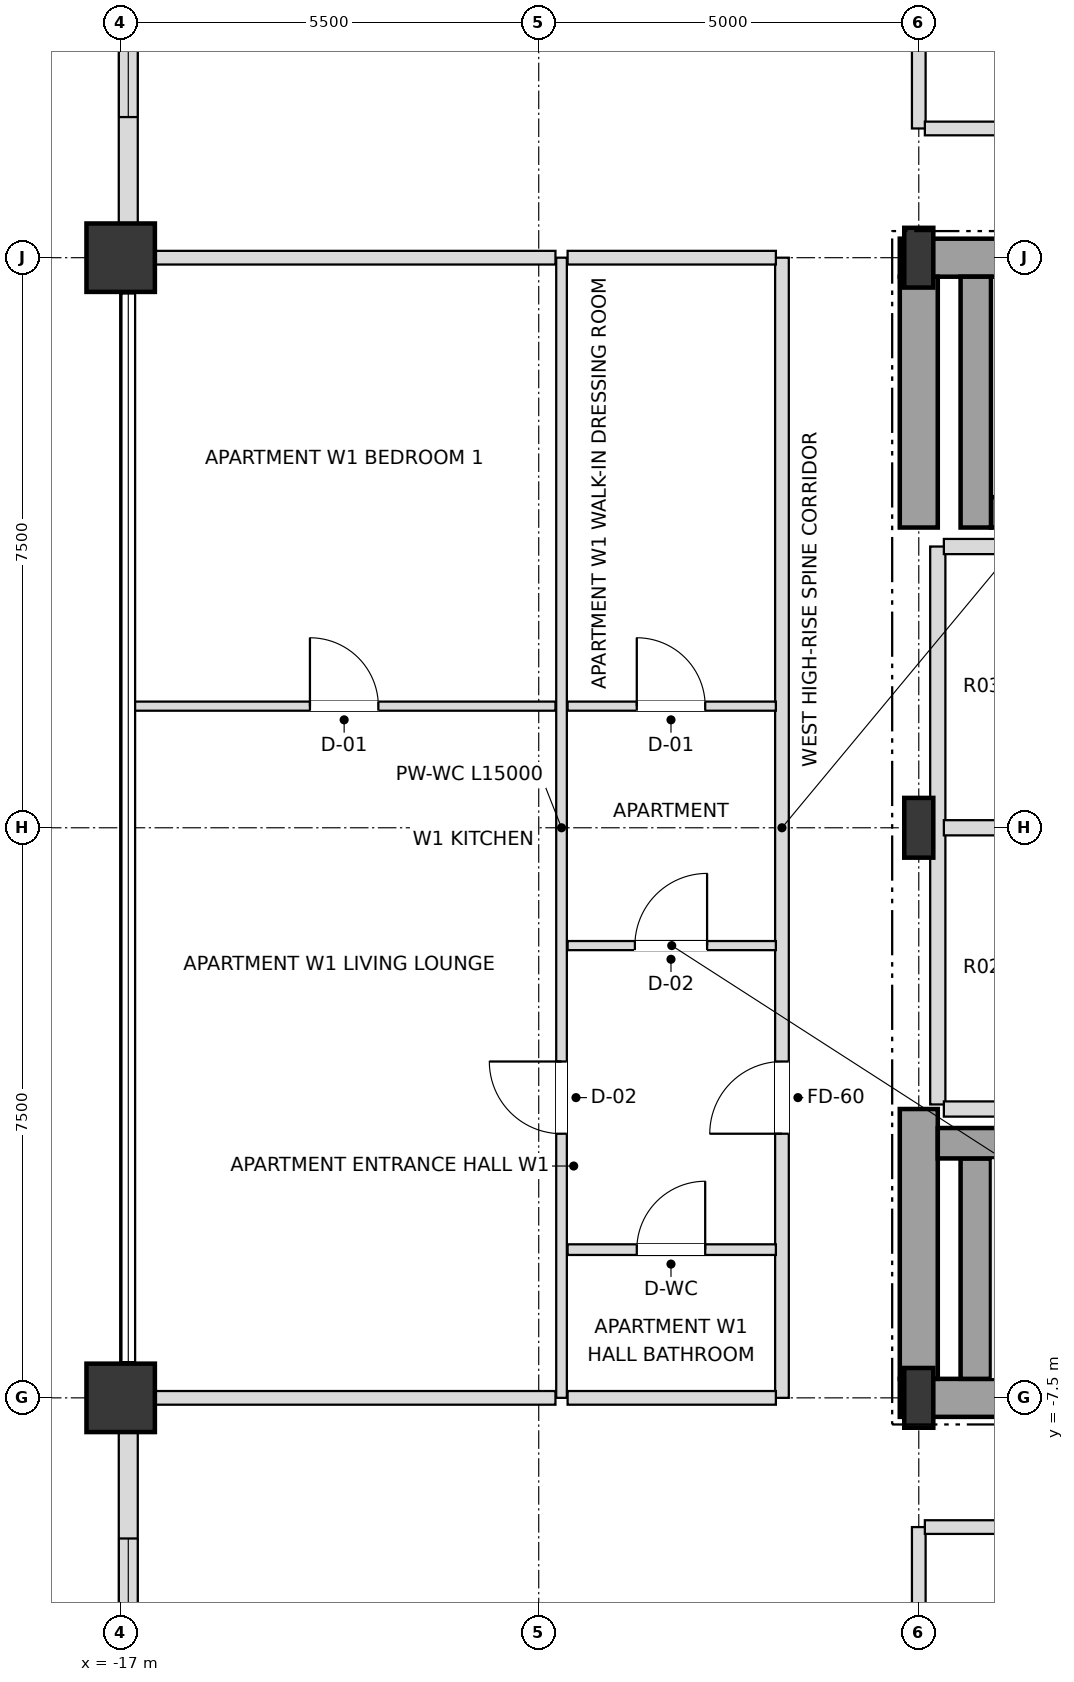
"""IFC4 building model, lengths in metres.
Left out: names, types, materials, properties, quantities, classifications, styles, units other than length and angle.
Written with IfcOpenShell. Run it as: python <this file> out.ifc"""

import sys

from ifc_helpers import new_model, si_unit, direction, frame, frame_2d, origin, origin_2d, place, context, subcontext, project, spatial, rectangle, i_section, extrude, element, fill, save


model = new_model("IFC4")
c1 = context("Model", 3, precision=1e-05, world=origin(), true_north=direction((0.0, 1.0)))
c2 = subcontext(c1, "Body", "Model", "MODEL_VIEW")
j1 = project(units=[si_unit("LENGTHUNIT", "METRE"), si_unit("PLANEANGLEUNIT", "RADIAN")], contexts=[c1])
p1 = place(None, origin())
s1 = spatial("IfcSite", under=j1, at=p1, CompositionType="ELEMENT")
p2 = place(p1, origin())
s2 = spatial("IfcBuilding", under=s1, at=p2, CompositionType="ELEMENT")
p3 = place(p2, frame((0.0, 0.0, 287.1)))
s3 = spatial("IfcBuildingStorey", under=s2, at=p3, CompositionType="ELEMENT", Elevation=287.1)
for number, where, z_axis, x_axis in (
    (1, (-6.5, -7.5, 0.0), (0.0, 0.0, 1.0), (1.0, 0.0, 0.0)),
    (2, (-6.5, 0.0, 0.0), (0.0, 0.0, 1.0), (1.0, 0.0, 0.0)),
    (3, (-6.5, 7.5, 0.0), (0.0, 0.0, 1.0), (1.0, 0.0, 0.0)),
):
    element("IfcColumn", number, at=place(p3, frame(where, z_axis=z_axis, x_axis=x_axis)), inside=s3, PredefinedType="COLUMN", context=c2, shape_type="SweptSolid", body=[
        extrude(i_section(OverallWidth=0.382, OverallDepth=0.786, WebThickness=0.02, FlangeThickness=0.033, at=origin_2d()), origin(), (0.0, 0.0, 1.0), 3.6),
    ])
for number, where, z_axis, x_axis in (
    (4, (-17.0, 7.5, 0.0), (0.0, 0.0, 1.0), (1.0, 0.0, 0.0)),
    (5, (-17.0, -7.5, 0.0), (0.0, 0.0, 1.0), (1.0, 0.0, 0.0)),
):
    element("IfcColumn", number, at=place(p3, frame(where, z_axis=z_axis, x_axis=x_axis)), inside=s3, PredefinedType="USERDEFINED", context=c2, shape_type="SweptSolid", body=[
        extrude(rectangle(XDim=0.9, YDim=0.9, at=origin_2d()), origin(), (0.0, 0.0, 1.0), 3.6),
    ])
p4 = place(p3, frame((-16.9, 12.555, 0.0), z_axis=(0.0, 0.0, 1.0), x_axis=(0.0, -1.0, 0.0)))
e6 = element("IfcWall", 6, at=p4, inside=s3, PredefinedType="SOLIDWALL", context=c2, shape_type="SweptSolid", body=[
    extrude(rectangle(XDim=4.61, YDim=0.25, at=frame_2d((2.305, 0.0))), origin(), (0.0, 0.0, 1.0), 2.748),
])
p5 = place(p4, frame((1.405, 0.0, 0.72)))
e7 = element("IfcOpeningElement", 7, at=p5, cuts=e6, PredefinedType="OPENING", context=c2, shape_type="SweptSolid", body=[
    extrude(rectangle(XDim=1.8, YDim=1.68, at=frame_2d((0.9, 0.84))), frame((0.0, 0.135, 0.0), z_axis=(0.0, -1.0, 0.0), x_axis=(1.0, 0.0, 0.0)), (0.0, 0.0, 1.0), 0.27),
])
p6 = place(p3, frame((-16.9, -7.945, 0.0), z_axis=(0.0, 0.0, 1.0), x_axis=(0.0, -1.0, 0.0)))
e8 = element("IfcWall", 8, at=p6, inside=s3, PredefinedType="SOLIDWALL", context=c2, shape_type="SweptSolid", body=[
    extrude(rectangle(XDim=4.61, YDim=0.25, at=frame_2d((2.305, 0.0))), origin(), (0.0, 0.0, 1.0), 2.748),
])
p7 = place(p6, frame((1.405, 0.0, 0.72)))
e9 = element("IfcOpeningElement", 9, at=p7, cuts=e8, PredefinedType="OPENING", context=c2, shape_type="SweptSolid", body=[
    extrude(rectangle(XDim=1.8, YDim=1.68, at=frame_2d((0.9, 0.84))), frame((0.0, 0.135, 0.0), z_axis=(0.0, -1.0, 0.0), x_axis=(1.0, 0.0, 0.0)), (0.0, 0.0, 1.0), 0.27),
])
p8 = place(p3, frame((-6.75, -7.5, 0.0), z_axis=(0.0, 0.0, 1.0), x_axis=(1.0, 0.0, 0.0)))
e10 = element("IfcWall", 10, at=p8, inside=s3, PredefinedType="SHEAR", context=c2, shape_type="SweptSolid", body=[
    extrude(rectangle(XDim=6.75, YDim=0.5, at=frame_2d((3.375, 0.0))), origin(), (0.0, 0.0, 1.0), 3.38),
])
p9 = place(p3, frame((-6.75, 7.5, 0.0), z_axis=(0.0, 0.0, 1.0), x_axis=(1.0, 0.0, 0.0)))
e11 = element("IfcWall", 11, at=p9, inside=s3, PredefinedType="SHEAR", context=c2, shape_type="SweptSolid", body=[
    extrude(rectangle(XDim=6.75, YDim=0.5, at=frame_2d((3.375, 0.0))), origin(), (0.0, 0.0, 1.0), 3.38),
])
p10 = place(p9, frame((1.65, 0.0, 0.0)))
e12 = element("IfcOpeningElement", 12, at=p10, cuts=e11, PredefinedType="OPENING", context=c2, shape_type="SweptSolid", body=[
    extrude(rectangle(XDim=1.05, YDim=2.15, at=frame_2d((0.525, 1.075))), frame((0.0, 0.26, 0.0), z_axis=(0.0, -1.0, 0.0), x_axis=(1.0, 0.0, 0.0)), (0.0, 0.0, 1.0), 0.52),
])
p11 = place(p3, frame((-6.5, -7.25, 0.0), z_axis=(0.0, 0.0, 1.0), x_axis=(0.0, 1.0, 0.0)))
e13 = element("IfcWall", 13, at=p11, inside=s3, PredefinedType="SHEAR", context=c2, shape_type="SweptSolid", body=[
    extrude(rectangle(XDim=3.55, YDim=0.5, at=frame_2d((1.775, 0.0))), origin(), (0.0, 0.0, 1.0), 3.38),
])
p12 = place(p3, frame((-6.5, 3.95, 0.0), z_axis=(0.0, 0.0, 1.0), x_axis=(0.0, 1.0, 0.0)))
e14 = element("IfcWall", 14, at=p12, inside=s3, PredefinedType="SHEAR", context=c2, shape_type="SweptSolid", body=[
    extrude(rectangle(XDim=3.3, YDim=0.5, at=frame_2d((1.65, 0.0))), origin(), (0.0, 0.0, 1.0), 3.38),
])
p13 = place(p3, frame((-5.75, -7.25, 0.0), z_axis=(0.0, 0.0, 1.0), x_axis=(0.0, 1.0, 0.0)))
e15 = element("IfcWall", 15, at=p13, inside=s3, PredefinedType="SHEAR", context=c2, shape_type="SweptSolid", body=[
    extrude(rectangle(XDim=2.9, YDim=0.4, at=frame_2d((1.45, 0.0))), origin(), (0.0, 0.0, 1.0), 3.38),
])
p14 = place(p3, frame((-6.25, -4.15, 0.0), z_axis=(0.0, 0.0, 1.0), x_axis=(1.0, 0.0, 0.0)))
e16 = element("IfcWall", 16, at=p14, inside=s3, PredefinedType="SHEAR", context=c2, shape_type="SweptSolid", body=[
    extrude(rectangle(XDim=7.78, YDim=0.4, at=frame_2d((3.89, 0.0))), origin(), (0.0, 0.0, 1.0), 3.38),
])
p15 = place(p3, frame((-5.55, 4.15, 0.0), z_axis=(0.0, 0.0, 1.0), x_axis=(1.0, 0.0, 0.0)))
e17 = element("IfcWall", 17, at=p15, inside=s3, PredefinedType="SHEAR", context=c2, shape_type="SweptSolid", body=[
    extrude(rectangle(XDim=7.08, YDim=0.4, at=frame_2d((3.54, 0.0))), origin(), (0.0, 0.0, 1.0), 3.38),
])
p16 = place(p3, frame((-5.75, 3.95, 0.0), z_axis=(0.0, 0.0, 1.0), x_axis=(0.0, 1.0, 0.0)))
e18 = element("IfcWall", 18, at=p16, inside=s3, PredefinedType="SHEAR", context=c2, shape_type="SweptSolid", body=[
    extrude(rectangle(XDim=3.3, YDim=0.4, at=frame_2d((1.65, 0.0))), origin(), (0.0, 0.0, 1.0), 3.38),
])
p17 = place(p3, frame((-11.2, -7.5, 0.0), z_axis=(0.0, 0.0, 1.0), x_axis=(0.0, 1.0, 0.0)))
e19 = element("IfcWall", 19, at=p17, inside=s3, PredefinedType="PARTITIONING", context=c2, shape_type="SweptSolid", body=[
    extrude(rectangle(XDim=15.0, YDim=0.14, at=frame_2d((7.5, 0.0))), origin(), (0.0, 0.0, 1.0), 3.38),
])
p18 = place(p17, frame((3.475, 0.0, 0.0)))
e20 = element("IfcOpeningElement", 20, at=p18, cuts=e19, PredefinedType="OPENING", context=c2, shape_type="SweptSolid", body=[
    extrude(rectangle(XDim=0.95, YDim=2.1, at=frame_2d((0.475, 1.05))), frame((0.0, 0.08, 0.0), z_axis=(0.0, -1.0, 0.0), x_axis=(1.0, 0.0, 0.0)), (0.0, 0.0, 1.0), 0.16),
])
p19 = place(p3, frame((-8.3, -7.5, 0.0), z_axis=(0.0, 0.0, 1.0), x_axis=(0.0, 1.0, 0.0)))
e21 = element("IfcWall", 21, at=p19, inside=s3, PredefinedType="PARTITIONING", context=c2, shape_type="SweptSolid", body=[
    extrude(rectangle(XDim=15.0, YDim=0.18, at=frame_2d((7.5, 0.0))), origin(), (0.0, 0.0, 1.0), 3.38),
])
p20 = place(p19, frame((3.475, 0.0, 0.0)))
e22 = element("IfcOpeningElement", 22, at=p20, cuts=e21, PredefinedType="OPENING", context=c2, shape_type="SweptSolid", body=[
    extrude(rectangle(XDim=0.95, YDim=2.15, at=frame_2d((0.475, 1.075))), frame((0.0, 0.1, 0.0), z_axis=(0.0, -1.0, 0.0), x_axis=(1.0, 0.0, 0.0)), (0.0, 0.0, 1.0), 0.2),
])
for number, where, z_axis, x_axis in (
    (23, (-6.5, -19.9, 0.0), (0.0, 0.0, 1.0), (0.0, 1.0, 0.0)),
    (24, (-6.5, 9.2, 0.0), (0.0, 0.0, 1.0), (0.0, 1.0, 0.0)),
):
    element("IfcWall", number, at=place(p3, frame(where, z_axis=z_axis, x_axis=x_axis)), inside=s3, PredefinedType="PARTITIONING", context=c2, shape_type="SweptSolid", body=[
        extrude(rectangle(XDim=10.7, YDim=0.18, at=frame_2d((5.35, 0.0))), origin(), (0.0, 0.0, 1.0), 2.826),
    ])
p21 = place(p3, frame((-6.25, -3.64, 0.0), z_axis=(0.0, 0.0, 1.0), x_axis=(0.0, 1.0, 0.0)))
e25 = element("IfcWall", 25, at=p21, inside=s3, PredefinedType="SOLIDWALL", context=c2, shape_type="SweptSolid", body=[
    extrude(rectangle(XDim=7.34, YDim=0.2, at=frame_2d((3.67, 0.0))), origin(), (0.0, 0.0, 1.0), 3.38),
])
p22 = place(p3, frame((-6.42, -9.2, 0.0), z_axis=(0.0, 0.0, 1.0), x_axis=(1.0, 0.0, 0.0)))
e26 = element("IfcWall", 26, at=p22, inside=s3, PredefinedType="PARTITIONING", context=c2, shape_type="SweptSolid", body=[
    extrude(rectangle(XDim=5.19, YDim=0.18, at=frame_2d((2.595, 0.0))), origin(), (0.0, 0.0, 1.0), 3.38),
])
p23 = place(p22, frame((2.135, 0.0, 0.0)))
e27 = element("IfcOpeningElement", 27, at=p23, cuts=e26, PredefinedType="OPENING", context=c2, shape_type="SweptSolid", body=[
    extrude(rectangle(XDim=0.95, YDim=2.15, at=frame_2d((0.475, 1.075))), frame((0.0, 0.1, 0.0), z_axis=(0.0, -1.0, 0.0), x_axis=(1.0, 0.0, 0.0)), (0.0, 0.0, 1.0), 0.2),
])
p24 = place(p3, frame((-16.9, -7.5, 0.0), z_axis=(0.0, 0.0, 1.0), x_axis=(1.0, 0.0, 0.0)))
e28 = element("IfcWall", 28, at=p24, inside=s3, PredefinedType="PARTITIONING", context=c2, shape_type="SweptSolid", body=[
    extrude(rectangle(XDim=5.62, YDim=0.18, at=frame_2d((2.81, 0.0))), origin(), (0.0, 0.0, 1.0), 2.826),
])
p25 = place(p3, frame((-11.12, -7.5, 0.0), z_axis=(0.0, 0.0, 1.0), x_axis=(1.0, 0.0, 0.0)))
e29 = element("IfcWall", 29, at=p25, inside=s3, PredefinedType="PARTITIONING", context=c2, shape_type="SweptSolid", body=[
    extrude(rectangle(XDim=2.74, YDim=0.18, at=frame_2d((1.37, 0.0))), origin(), (0.0, 0.0, 1.0), 2.826),
])
p26 = place(p3, frame((-11.12, -5.55, 0.0), z_axis=(0.0, 0.0, 1.0), x_axis=(1.0, 0.0, 0.0)))
e30 = element("IfcWall", 30, at=p26, inside=s3, PredefinedType="PARTITIONING", context=c2, shape_type="SweptSolid", body=[
    extrude(rectangle(XDim=2.74, YDim=0.14, at=frame_2d((1.37, 0.0))), origin(), (0.0, 0.0, 1.0), 3.38),
])
p27 = place(p26, frame((0.91, 0.0, 0.0)))
e31 = element("IfcOpeningElement", 31, at=p27, cuts=e30, PredefinedType="OPENING", context=c2, shape_type="SweptSolid", body=[
    extrude(rectangle(XDim=0.9, YDim=2.1, at=frame_2d((0.45, 1.05))), frame((0.0, 0.08, 0.0), z_axis=(0.0, -1.0, 0.0), x_axis=(1.0, 0.0, 0.0)), (0.0, 0.0, 1.0), 0.16),
])
p28 = place(p3, frame((-6.17, -3.7, 0.0), z_axis=(0.0, 0.0, 1.0), x_axis=(1.0, 0.0, 0.0)))
e32 = element("IfcWall", 32, at=p28, inside=s3, PredefinedType="SOLIDWALL", context=c2, shape_type="SweptSolid", body=[
    extrude(rectangle(XDim=1.94, YDim=0.2, at=frame_2d((0.97, 0.0))), origin(), (0.0, 0.0, 1.0), 3.38),
])
p29 = place(p3, frame((-11.12, -1.55, 0.0), z_axis=(0.0, 0.0, 1.0), x_axis=(1.0, 0.0, 0.0)))
e33 = element("IfcWall", 33, at=p29, inside=s3, PredefinedType="PARTITIONING", context=c2, shape_type="SweptSolid", body=[
    extrude(rectangle(XDim=2.74, YDim=0.12, at=frame_2d((1.37, 0.0))), origin(), (0.0, 0.0, 1.0), 3.38),
])
p30 = place(p29, frame((0.885, 0.0, 0.0)))
e34 = element("IfcOpeningElement", 34, at=p30, cuts=e33, PredefinedType="OPENING", context=c2, shape_type="SweptSolid", body=[
    extrude(rectangle(XDim=0.95, YDim=2.1, at=frame_2d((0.475, 1.05))), frame((0.0, 0.07, 0.0), z_axis=(0.0, -1.0, 0.0), x_axis=(1.0, 0.0, 0.0)), (0.0, 0.0, 1.0), 0.14),
])
p31 = place(p3, frame((-6.17, 0.0, 0.0), z_axis=(0.0, 0.0, 1.0), x_axis=(1.0, 0.0, 0.0)))
e35 = element("IfcWall", 35, at=p31, inside=s3, PredefinedType="SOLIDWALL", context=c2, shape_type="SweptSolid", body=[
    extrude(rectangle(XDim=1.94, YDim=0.2, at=frame_2d((0.97, 0.0))), origin(), (0.0, 0.0, 1.0), 3.38),
])
p32 = place(p3, frame((-16.82, 1.6, 0.0), z_axis=(0.0, 0.0, 1.0), x_axis=(1.0, 0.0, 0.0)))
e36 = element("IfcWall", 36, at=p32, inside=s3, PredefinedType="PARTITIONING", context=c2, shape_type="SweptSolid", body=[
    extrude(rectangle(XDim=5.54, YDim=0.12, at=frame_2d((2.77, 0.0))), origin(), (0.0, 0.0, 1.0), 3.018),
])
p33 = place(p32, frame((2.31, 0.0, 0.0)))
e37 = element("IfcOpeningElement", 37, at=p33, cuts=e36, PredefinedType="OPENING", context=c2, shape_type="SweptSolid", body=[
    extrude(rectangle(XDim=0.9, YDim=2.1, at=frame_2d((0.45, 1.05))), frame((0.0, 0.07, 0.0), z_axis=(0.0, -1.0, 0.0), x_axis=(1.0, 0.0, 0.0)), (0.0, 0.0, 1.0), 0.14),
])
p34 = place(p3, frame((-11.12, 1.6, 0.0), z_axis=(0.0, 0.0, 1.0), x_axis=(1.0, 0.0, 0.0)))
e38 = element("IfcWall", 38, at=p34, inside=s3, PredefinedType="PARTITIONING", context=c2, shape_type="SweptSolid", body=[
    extrude(rectangle(XDim=2.74, YDim=0.12, at=frame_2d((1.37, 0.0))), origin(), (0.0, 0.0, 1.0), 3.38),
])
p35 = place(p34, frame((0.91, 0.0, 0.0)))
e39 = element("IfcOpeningElement", 39, at=p35, cuts=e38, PredefinedType="OPENING", context=c2, shape_type="SweptSolid", body=[
    extrude(rectangle(XDim=0.9, YDim=2.1, at=frame_2d((0.45, 1.05))), frame((0.0, 0.07, 0.0), z_axis=(0.0, -1.0, 0.0), x_axis=(1.0, 0.0, 0.0)), (0.0, 0.0, 1.0), 0.14),
])
p36 = place(p3, frame((-6.17, 3.7, 0.0), z_axis=(0.0, 0.0, 1.0), x_axis=(1.0, 0.0, 0.0)))
e40 = element("IfcWall", 40, at=p36, inside=s3, PredefinedType="SOLIDWALL", context=c2, shape_type="SweptSolid", body=[
    extrude(rectangle(XDim=1.94, YDim=0.2, at=frame_2d((0.97, 0.0))), origin(), (0.0, 0.0, 1.0), 3.38),
])
p37 = place(p3, frame((-16.9, 7.5, 0.0), z_axis=(0.0, 0.0, 1.0), x_axis=(1.0, 0.0, 0.0)))
e41 = element("IfcWall", 41, at=p37, inside=s3, PredefinedType="PARTITIONING", context=c2, shape_type="SweptSolid", body=[
    extrude(rectangle(XDim=5.62, YDim=0.18, at=frame_2d((2.81, 0.0))), origin(), (0.0, 0.0, 1.0), 2.826),
])
p38 = place(p3, frame((-11.12, 7.5, 0.0), z_axis=(0.0, 0.0, 1.0), x_axis=(1.0, 0.0, 0.0)))
e42 = element("IfcWall", 42, at=p38, inside=s3, PredefinedType="PARTITIONING", context=c2, shape_type="SweptSolid", body=[
    extrude(rectangle(XDim=2.74, YDim=0.18, at=frame_2d((1.37, 0.0))), origin(), (0.0, 0.0, 1.0), 2.826),
])
p39 = place(p3, frame((-6.42, 9.2, 0.0), z_axis=(0.0, 0.0, 1.0), x_axis=(1.0, 0.0, 0.0)))
e43 = element("IfcWall", 43, at=p39, inside=s3, PredefinedType="PARTITIONING", context=c2, shape_type="SweptSolid", body=[
    extrude(rectangle(XDim=5.19, YDim=0.18, at=frame_2d((2.595, 0.0))), origin(), (0.0, 0.0, 1.0), 3.38),
])
p40 = place(p39, frame((2.135, 0.0, 0.0)))
e44 = element("IfcOpeningElement", 44, at=p40, cuts=e43, PredefinedType="OPENING", context=c2, shape_type="SweptSolid", body=[
    extrude(rectangle(XDim=0.95, YDim=2.15, at=frame_2d((0.475, 1.075))), frame((0.0, 0.1, 0.0), z_axis=(0.0, -1.0, 0.0), x_axis=(1.0, 0.0, 0.0)), (0.0, 0.0, 1.0), 0.2),
])
p41 = place(p5, origin())
e45 = element("IfcWindow", 45, at=p41, inside=s3, PartitioningType="SINGLE_PANEL", PredefinedType="WINDOW", context=c2, shape_type="SweptSolid", body=[
    extrude(rectangle(XDim=1.8, YDim=1.68, at=frame_2d((0.9, 0.84))), frame((0.0, 0.03, 0.0), z_axis=(0.0, -1.0, 0.0), x_axis=(1.0, 0.0, 0.0)), (0.0, 0.0, 1.0), 0.06),
])
fill(e7, e45)
p42 = place(p7, origin())
e46 = element("IfcWindow", 46, at=p42, inside=s3, PartitioningType="SINGLE_PANEL", PredefinedType="WINDOW", context=c2, shape_type="SweptSolid", body=[
    extrude(rectangle(XDim=1.8, YDim=1.68, at=frame_2d((0.9, 0.84))), frame((0.0, 0.03, 0.0), z_axis=(0.0, -1.0, 0.0), x_axis=(1.0, 0.0, 0.0)), (0.0, 0.0, 1.0), 0.06),
])
fill(e9, e46)
p43 = place(p27, origin())
e47 = element("IfcDoor", 47, at=p43, inside=s3, OperationType="SINGLE_SWING_RIGHT", PredefinedType="DOOR", context=c2, shape_type="SweptSolid", body=[
    extrude(rectangle(XDim=0.9, YDim=2.1, at=frame_2d((0.45, 1.05))), frame((0.0, 0.025, 0.0), z_axis=(0.0, -1.0, 0.0), x_axis=(1.0, 0.0, 0.0)), (0.0, 0.0, 1.0), 0.05),
])
fill(e31, e47)
p44 = place(p20, origin())
e48 = element("IfcDoor", 48, at=p44, inside=s3, OperationType="SINGLE_SWING_LEFT", PredefinedType="DOOR", context=c2, shape_type="SweptSolid", body=[
    extrude(rectangle(XDim=0.95, YDim=2.15, at=frame_2d((0.475, 1.075))), frame((0.0, 0.025, 0.0), z_axis=(0.0, -1.0, 0.0), x_axis=(1.0, 0.0, 0.0)), (0.0, 0.0, 1.0), 0.05),
])
fill(e22, e48)
p45 = place(p30, origin())
e49 = element("IfcDoor", 49, at=p45, inside=s3, OperationType="SINGLE_SWING_RIGHT", PredefinedType="DOOR", context=c2, shape_type="SweptSolid", body=[
    extrude(rectangle(XDim=0.95, YDim=2.1, at=frame_2d((0.475, 1.05))), frame((0.0, 0.025, 0.0), z_axis=(0.0, -1.0, 0.0), x_axis=(1.0, 0.0, 0.0)), (0.0, 0.0, 1.0), 0.05),
])
fill(e34, e49)
p46 = place(p35, origin())
e50 = element("IfcDoor", 50, at=p46, inside=s3, OperationType="SINGLE_SWING_LEFT", PredefinedType="DOOR", context=c2, shape_type="SweptSolid", body=[
    extrude(rectangle(XDim=0.9, YDim=2.1, at=frame_2d((0.45, 1.05))), frame((0.0, 0.025, 0.0), z_axis=(0.0, -1.0, 0.0), x_axis=(1.0, 0.0, 0.0)), (0.0, 0.0, 1.0), 0.05),
])
fill(e39, e50)
p47 = place(p18, origin())
e51 = element("IfcDoor", 51, at=p47, inside=s3, OperationType="SINGLE_SWING_RIGHT", PredefinedType="DOOR", context=c2, shape_type="SweptSolid", body=[
    extrude(rectangle(XDim=0.95, YDim=2.1, at=frame_2d((0.475, 1.05))), frame((0.0, 0.025, 0.0), z_axis=(0.0, -1.0, 0.0), x_axis=(1.0, 0.0, 0.0)), (0.0, 0.0, 1.0), 0.05),
])
fill(e20, e51)
p48 = place(p33, origin())
e52 = element("IfcDoor", 52, at=p48, inside=s3, OperationType="SINGLE_SWING_LEFT", PredefinedType="DOOR", context=c2, shape_type="SweptSolid", body=[
    extrude(rectangle(XDim=0.9, YDim=2.1, at=frame_2d((0.45, 1.05))), frame((0.0, 0.025, 0.0), z_axis=(0.0, -1.0, 0.0), x_axis=(1.0, 0.0, 0.0)), (0.0, 0.0, 1.0), 0.05),
])
fill(e37, e52)
save(model, sys.argv[1])
